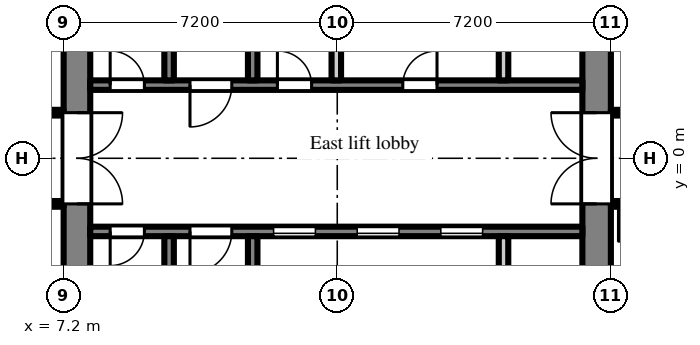
"""IFC4 building model, lengths in metres.
Left out: names, types, materials, properties, quantities, classifications, styles, units other than length and angle.
Written with IfcOpenShell. Run it as: python <this file> out.ifc"""

import sys

from ifc_helpers import new_model, si_unit, direction, frame, frame_2d, origin, place, context, subcontext, project, spatial, rectangle, extrude, element, fill, save


model = new_model("IFC4")
c1 = context("Model", 3, precision=1e-05, world=origin(), true_north=direction((0.0, 1.0)))
c2 = subcontext(c1, "Body", "Model", "MODEL_VIEW")
j1 = project(units=[si_unit("LENGTHUNIT", "METRE"), si_unit("PLANEANGLEUNIT", "RADIAN")], contexts=[c1])
p1 = place(None, origin())
s1 = spatial("IfcSite", under=j1, at=p1, CompositionType="ELEMENT")
p2 = place(p1, origin())
s2 = spatial("IfcBuilding", under=s1, at=p2, CompositionType="ELEMENT")
p3 = place(p2, frame((0.0, 0.0, 108.9)))
s3 = spatial("IfcBuildingStorey", under=s2, at=p3, CompositionType="ELEMENT", Elevation=108.9)
p4 = place(p3, frame((7.55, -7.2, 0.0), z_axis=(0.0, 0.0, 1.0), x_axis=(0.0, 1.0, 0.0)))
e1 = element("IfcWall", 1, at=p4, inside=s3, PredefinedType="SHEAR", context=c2, shape_type="SweptSolid", body=[
    extrude(rectangle(XDim=14.4, YDim=0.7, at=frame_2d((7.2, 0.0))), origin(), (0.0, 0.0, 1.0), 2.55),
])
p5 = place(p4, frame((6.0, 0.0, 0.0)))
e2 = element("IfcOpeningElement", 2, at=p5, cuts=e1, PredefinedType="OPENING", context=c2, shape_type="SweptSolid", body=[
    extrude(rectangle(XDim=2.4, YDim=2.2, at=frame_2d((1.2, 1.1))), frame((0.0, 0.36, 0.0), z_axis=(0.0, -1.0, 0.0), x_axis=(1.0, 0.0, 0.0)), (0.0, 0.0, 1.0), 0.72),
])
p6 = place(p3, frame((21.225, -7.2, 0.0), z_axis=(0.0, 0.0, 1.0), x_axis=(0.0, 1.0, 0.0)))
e3 = element("IfcWall", 3, at=p6, inside=s3, PredefinedType="SHEAR", context=c2, shape_type="SweptSolid", body=[
    extrude(rectangle(XDim=14.4, YDim=0.75, at=frame_2d((7.2, 0.0))), origin(), (0.0, 0.0, 1.0), 2.55),
])
p7 = place(p6, frame((6.0, 0.0, 0.0)))
e4 = element("IfcOpeningElement", 4, at=p7, cuts=e3, PredefinedType="OPENING", context=c2, shape_type="SweptSolid", body=[
    extrude(rectangle(XDim=2.4, YDim=2.2, at=frame_2d((1.2, 1.1))), frame((0.0, 0.385, 0.0), z_axis=(0.0, -1.0, 0.0), x_axis=(1.0, 0.0, 0.0)), (0.0, 0.0, 1.0), 0.77),
])
p8 = place(p3, frame((7.9, 1.925, 0.0), z_axis=(0.0, 0.0, 1.0), x_axis=(1.0, 0.0, 0.0)))
e5 = element("IfcWall", 5, at=p8, inside=s3, PredefinedType="SHEAR", context=c2, shape_type="SweptSolid", body=[
    extrude(rectangle(XDim=12.95, YDim=0.25, at=frame_2d((6.475, 0.0))), origin(), (0.0, 0.0, 1.0), 2.55),
])
p9 = place(p8, frame((0.525, 0.0, 0.0)))
e6 = element("IfcOpeningElement", 6, at=p9, cuts=e5, PredefinedType="OPENING", context=c2, shape_type="SweptSolid", body=[
    extrude(rectangle(XDim=0.9, YDim=2.1, at=frame_2d((0.45, 1.05))), frame((0.0, 0.135, 0.0), z_axis=(0.0, -1.0, 0.0), x_axis=(1.0, 0.0, 0.0)), (0.0, 0.0, 1.0), 0.27),
])
p10 = place(p8, frame((2.625, 0.0, 0.0)))
e7 = element("IfcOpeningElement", 7, at=p10, cuts=e5, PredefinedType="OPENING", context=c2, shape_type="SweptSolid", body=[
    extrude(rectangle(XDim=1.1, YDim=2.1, at=frame_2d((0.55, 1.05))), frame((0.0, 0.135, 0.0), z_axis=(0.0, -1.0, 0.0), x_axis=(1.0, 0.0, 0.0)), (0.0, 0.0, 1.0), 0.27),
])
p11 = place(p8, frame((4.925, 0.0, 0.0)))
e8 = element("IfcOpeningElement", 8, at=p11, cuts=e5, PredefinedType="OPENING", context=c2, shape_type="SweptSolid", body=[
    extrude(rectangle(XDim=0.9, YDim=2.1, at=frame_2d((0.45, 1.05))), frame((0.0, 0.135, 0.0), z_axis=(0.0, -1.0, 0.0), x_axis=(1.0, 0.0, 0.0)), (0.0, 0.0, 1.0), 0.27),
])
p12 = place(p8, frame((8.225, 0.0, 0.0)))
e9 = element("IfcOpeningElement", 9, at=p12, cuts=e5, PredefinedType="OPENING", context=c2, shape_type="SweptSolid", body=[
    extrude(rectangle(XDim=0.9, YDim=2.1, at=frame_2d((0.45, 1.05))), frame((0.0, 0.135, 0.0), z_axis=(0.0, -1.0, 0.0), x_axis=(1.0, 0.0, 0.0)), (0.0, 0.0, 1.0), 0.27),
])
p13 = place(p3, frame((9.975, 2.05, 0.0), z_axis=(0.0, 0.0, 1.0), x_axis=(0.0, 1.0, 0.0)))
e10 = element("IfcWall", 10, at=p13, inside=s3, PredefinedType="SHEAR", context=c2, shape_type="SweptSolid", body=[
    extrude(rectangle(XDim=4.65, YDim=0.25, at=frame_2d((2.325, 0.0))), origin(), (0.0, 0.0, 1.0), 2.55),
])
p14 = place(p13, frame((2.95, 0.0, 0.0)))
e11 = element("IfcOpeningElement", 11, at=p14, cuts=e10, PredefinedType="OPENING", context=c2, shape_type="SweptSolid", body=[
    extrude(rectangle(XDim=1.1, YDim=2.1, at=frame_2d((0.55, 1.05))), frame((0.0, 0.135, 0.0), z_axis=(0.0, -1.0, 0.0), x_axis=(1.0, 0.0, 0.0)), (0.0, 0.0, 1.0), 0.27),
])
p15 = place(p3, frame((12.175, 2.05, 0.0), z_axis=(0.0, 0.0, 1.0), x_axis=(0.0, 1.0, 0.0)))
e12 = element("IfcWall", 12, at=p15, inside=s3, PredefinedType="SHEAR", context=c2, shape_type="SweptSolid", body=[
    extrude(rectangle(XDim=4.65, YDim=0.25, at=frame_2d((2.325, 0.0))), origin(), (0.0, 0.0, 1.0), 2.55),
])
p16 = place(p15, frame((2.95, 0.0, 0.0)))
e13 = element("IfcOpeningElement", 13, at=p16, cuts=e12, PredefinedType="OPENING", context=c2, shape_type="SweptSolid", body=[
    extrude(rectangle(XDim=1.1, YDim=2.1, at=frame_2d((0.55, 1.05))), frame((0.0, 0.135, 0.0), z_axis=(0.0, -1.0, 0.0), x_axis=(1.0, 0.0, 0.0)), (0.0, 0.0, 1.0), 0.27),
])
for number, where, z_axis, x_axis in (
    (14, (14.375, 2.05, 0.0), (0.0, 0.0, 1.0), (0.0, 1.0, 0.0)),
    (15, (18.775, 2.05, 0.0), (0.0, 0.0, 1.0), (0.0, 1.0, 0.0)),
):
    element("IfcWall", number, at=place(p3, frame(where, z_axis=z_axis, x_axis=x_axis)), inside=s3, PredefinedType="PARTITIONING", context=c2, shape_type="SweptSolid", body=[
        extrude(rectangle(XDim=2.1, YDim=0.25, at=frame_2d((1.05, 0.0))), origin(), (0.0, 0.0, 1.0), 2.55),
    ])
p17 = place(p3, frame((7.9, -1.925, 0.0), z_axis=(0.0, 0.0, 1.0), x_axis=(1.0, 0.0, 0.0)))
e16 = element("IfcWall", 16, at=p17, inside=s3, PredefinedType="SHEAR", context=c2, shape_type="SweptSolid", body=[
    extrude(rectangle(XDim=12.95, YDim=0.25, at=frame_2d((6.475, 0.0))), origin(), (0.0, 0.0, 1.0), 2.55),
])
p18 = place(p17, frame((4.825, 0.0, 0.0)))
e17 = element("IfcOpeningElement", 17, at=p18, cuts=e16, PredefinedType="OPENING", context=c2, shape_type="SweptSolid", body=[
    extrude(rectangle(XDim=1.1, YDim=2.1, at=frame_2d((0.55, 1.05))), frame((0.0, 0.135, 0.0), z_axis=(0.0, -1.0, 0.0), x_axis=(1.0, 0.0, 0.0)), (0.0, 0.0, 1.0), 0.27),
])
p19 = place(p17, frame((7.025, 0.0, 0.0)))
e18 = element("IfcOpeningElement", 18, at=p19, cuts=e16, PredefinedType="OPENING", context=c2, shape_type="SweptSolid", body=[
    extrude(rectangle(XDim=1.1, YDim=2.1, at=frame_2d((0.55, 1.05))), frame((0.0, 0.135, 0.0), z_axis=(0.0, -1.0, 0.0), x_axis=(1.0, 0.0, 0.0)), (0.0, 0.0, 1.0), 0.27),
])
p20 = place(p17, frame((9.225, 0.0, 0.0)))
e19 = element("IfcOpeningElement", 19, at=p20, cuts=e16, PredefinedType="OPENING", context=c2, shape_type="SweptSolid", body=[
    extrude(rectangle(XDim=1.1, YDim=2.1, at=frame_2d((0.55, 1.05))), frame((0.0, 0.135, 0.0), z_axis=(0.0, -1.0, 0.0), x_axis=(1.0, 0.0, 0.0)), (0.0, 0.0, 1.0), 0.27),
])
p21 = place(p17, frame((0.525, 0.0, 0.0)))
e20 = element("IfcOpeningElement", 20, at=p21, cuts=e16, PredefinedType="OPENING", context=c2, shape_type="SweptSolid", body=[
    extrude(rectangle(XDim=0.9, YDim=2.1, at=frame_2d((0.45, 1.05))), frame((0.0, 0.135, 0.0), z_axis=(0.0, -1.0, 0.0), x_axis=(1.0, 0.0, 0.0)), (0.0, 0.0, 1.0), 0.27),
])
p22 = place(p17, frame((2.625, 0.0, 0.0)))
e21 = element("IfcOpeningElement", 21, at=p22, cuts=e16, PredefinedType="OPENING", context=c2, shape_type="SweptSolid", body=[
    extrude(rectangle(XDim=1.1, YDim=2.1, at=frame_2d((0.55, 1.05))), frame((0.0, 0.135, 0.0), z_axis=(0.0, -1.0, 0.0), x_axis=(1.0, 0.0, 0.0)), (0.0, 0.0, 1.0), 0.27),
])
p23 = place(p3, frame((9.975, -2.05, 0.0), z_axis=(0.0, 0.0, 1.0), x_axis=(0.0, -1.0, 0.0)))
e22 = element("IfcWall", 22, at=p23, inside=s3, PredefinedType="SHEAR", context=c2, shape_type="SweptSolid", body=[
    extrude(rectangle(XDim=4.65, YDim=0.25, at=frame_2d((2.325, 0.0))), origin(), (0.0, 0.0, 1.0), 2.55),
])
p24 = place(p23, frame((2.95, 0.0, 0.0)))
e23 = element("IfcOpeningElement", 23, at=p24, cuts=e22, PredefinedType="OPENING", context=c2, shape_type="SweptSolid", body=[
    extrude(rectangle(XDim=1.1, YDim=2.1, at=frame_2d((0.55, 1.05))), frame((0.0, 0.135, 0.0), z_axis=(0.0, -1.0, 0.0), x_axis=(1.0, 0.0, 0.0)), (0.0, 0.0, 1.0), 0.27),
])
p25 = place(p3, frame((12.175, -2.05, 0.0), z_axis=(0.0, 0.0, 1.0), x_axis=(0.0, -1.0, 0.0)))
e24 = element("IfcWall", 24, at=p25, inside=s3, PredefinedType="SHEAR", context=c2, shape_type="SweptSolid", body=[
    extrude(rectangle(XDim=4.65, YDim=0.25, at=frame_2d((2.325, 0.0))), origin(), (0.0, 0.0, 1.0), 2.55),
])
p26 = place(p25, frame((2.95, 0.0, 0.0)))
e25 = element("IfcOpeningElement", 25, at=p26, cuts=e24, PredefinedType="OPENING", context=c2, shape_type="SweptSolid", body=[
    extrude(rectangle(XDim=1.1, YDim=2.1, at=frame_2d((0.55, 1.05))), frame((0.0, 0.135, 0.0), z_axis=(0.0, -1.0, 0.0), x_axis=(1.0, 0.0, 0.0)), (0.0, 0.0, 1.0), 0.27),
])
p27 = place(p3, frame((18.775, -2.05, 0.0), z_axis=(0.0, 0.0, 1.0), x_axis=(0.0, -1.0, 0.0)))
e26 = element("IfcWall", 26, at=p27, inside=s3, PredefinedType="PARTITIONING", context=c2, shape_type="SweptSolid", body=[
    extrude(rectangle(XDim=2.1, YDim=0.25, at=frame_2d((1.05, 0.0))), origin(), (0.0, 0.0, 1.0), 2.55),
])
p28 = place(p3, frame((1.275, -1.2, 0.0), z_axis=(0.0, 0.0, 1.0), x_axis=(1.0, 0.0, 0.0)))
e27 = element("IfcWall", 27, at=p28, inside=s3, PredefinedType="PARTITIONING", context=c2, shape_type="SweptSolid", body=[
    extrude(rectangle(XDim=5.925, YDim=0.15, at=frame_2d((2.962, 0.0))), origin(), (0.0, 0.0, 1.0), 2.55),
])
p29 = place(p28, frame((3.075, 0.0, 0.0)))
e28 = element("IfcOpeningElement", 28, at=p29, cuts=e27, PredefinedType="OPENING", context=c2, shape_type="SweptSolid", body=[
    extrude(rectangle(XDim=0.9, YDim=2.1, at=frame_2d((0.45, 1.05))), frame((0.0, 0.085, 0.0), z_axis=(0.0, -1.0, 0.0), x_axis=(1.0, 0.0, 0.0)), (0.0, 0.0, 1.0), 0.17),
])
p30 = place(p3, frame((1.275, 1.2, 0.0), z_axis=(0.0, 0.0, 1.0), x_axis=(1.0, 0.0, 0.0)))
e29 = element("IfcWall", 29, at=p30, inside=s3, PredefinedType="PARTITIONING", context=c2, shape_type="SweptSolid", body=[
    extrude(rectangle(XDim=5.925, YDim=0.15, at=frame_2d((2.962, 0.0))), origin(), (0.0, 0.0, 1.0), 2.55),
])
p31 = place(p30, frame((2.475, 0.0, 0.0)))
e30 = element("IfcOpeningElement", 30, at=p31, cuts=e29, PredefinedType="OPENING", context=c2, shape_type="SweptSolid", body=[
    extrude(rectangle(XDim=0.9, YDim=2.1, at=frame_2d((0.45, 1.05))), frame((0.0, 0.085, 0.0), z_axis=(0.0, -1.0, 0.0), x_axis=(1.0, 0.0, 0.0)), (0.0, 0.0, 1.0), 0.17),
])
p32 = place(p3, frame((21.6, -1.2, 0.0), z_axis=(0.0, 0.0, 1.0), x_axis=(1.0, 0.0, 0.0)))
e31 = element("IfcWall", 31, at=p32, inside=s3, PredefinedType="PARTITIONING", context=c2, shape_type="SweptSolid", body=[
    extrude(rectangle(XDim=14.9, YDim=0.15, at=frame_2d((7.45, 0.0))), origin(), (0.0, 0.0, 1.0), 2.55),
])
p33 = place(p32, frame((0.2, 0.0, 0.0)))
e32 = element("IfcOpeningElement", 32, at=p33, cuts=e31, PredefinedType="OPENING", context=c2, shape_type="SweptSolid", body=[
    extrude(rectangle(XDim=1.0, YDim=2.1, at=frame_2d((0.5, 1.05))), frame((0.0, 0.085, 0.0), z_axis=(0.0, -1.0, 0.0), x_axis=(1.0, 0.0, 0.0)), (0.0, 0.0, 1.0), 0.17),
])
p34 = place(p32, frame((5.71, 0.0, 0.0)))
e33 = element("IfcOpeningElement", 33, at=p34, cuts=e31, PredefinedType="OPENING", context=c2, shape_type="SweptSolid", body=[
    extrude(rectangle(XDim=1.0, YDim=2.1, at=frame_2d((0.5, 1.05))), frame((0.0, 0.085, 0.0), z_axis=(0.0, -1.0, 0.0), x_axis=(1.0, 0.0, 0.0)), (0.0, 0.0, 1.0), 0.17),
])
p35 = place(p32, frame((11.95, 0.0, 0.0)))
e34 = element("IfcOpeningElement", 34, at=p35, cuts=e31, PredefinedType="OPENING", context=c2, shape_type="SweptSolid", body=[
    extrude(rectangle(XDim=1.8, YDim=2.1, at=frame_2d((0.9, 1.05))), frame((0.0, 0.085, 0.0), z_axis=(0.0, -1.0, 0.0), x_axis=(1.0, 0.0, 0.0)), (0.0, 0.0, 1.0), 0.17),
])
p36 = place(p3, frame((21.6, 1.2, 0.0), z_axis=(0.0, 0.0, 1.0), x_axis=(1.0, 0.0, 0.0)))
e35 = element("IfcWall", 35, at=p36, inside=s3, PredefinedType="PARTITIONING", context=c2, shape_type="SweptSolid", body=[
    extrude(rectangle(XDim=14.9, YDim=0.15, at=frame_2d((7.45, 0.0))), origin(), (0.0, 0.0, 1.0), 2.55),
])
p37 = place(p36, frame((0.45, 0.0, 0.0)))
e36 = element("IfcOpeningElement", 36, at=p37, cuts=e35, PredefinedType="OPENING", context=c2, shape_type="SweptSolid", body=[
    extrude(rectangle(XDim=0.9, YDim=2.1, at=frame_2d((0.45, 1.05))), frame((0.0, 0.085, 0.0), z_axis=(0.0, -1.0, 0.0), x_axis=(1.0, 0.0, 0.0)), (0.0, 0.0, 1.0), 0.17),
])
p38 = place(p36, frame((2.25, 0.0, 0.0)))
e37 = element("IfcOpeningElement", 37, at=p38, cuts=e35, PredefinedType="OPENING", context=c2, shape_type="SweptSolid", body=[
    extrude(rectangle(XDim=0.9, YDim=2.1, at=frame_2d((0.45, 1.05))), frame((0.0, 0.085, 0.0), z_axis=(0.0, -1.0, 0.0), x_axis=(1.0, 0.0, 0.0)), (0.0, 0.0, 1.0), 0.17),
])
p39 = place(p36, frame((6.3, 0.0, 0.0)))
e38 = element("IfcOpeningElement", 38, at=p39, cuts=e35, PredefinedType="OPENING", context=c2, shape_type="SweptSolid", body=[
    extrude(rectangle(XDim=1.8, YDim=2.1, at=frame_2d((0.9, 1.05))), frame((0.0, 0.085, 0.0), z_axis=(0.0, -1.0, 0.0), x_axis=(1.0, 0.0, 0.0)), (0.0, 0.0, 1.0), 0.17),
])
p40 = place(p36, frame((11.95, 0.0, 0.0)))
e39 = element("IfcOpeningElement", 39, at=p40, cuts=e35, PredefinedType="OPENING", context=c2, shape_type="SweptSolid", body=[
    extrude(rectangle(XDim=1.8, YDim=2.1, at=frame_2d((0.9, 1.05))), frame((0.0, 0.085, 0.0), z_axis=(0.0, -1.0, 0.0), x_axis=(1.0, 0.0, 0.0)), (0.0, 0.0, 1.0), 0.17),
])
p41 = place(p18, origin())
e40 = element("IfcDoor", 40, at=p41, inside=s3, OperationType="SLIDING_TO_LEFT", PredefinedType="DOOR", context=c2, shape_type="SweptSolid", body=[
    extrude(rectangle(XDim=1.1, YDim=2.1, at=frame_2d((0.55, 1.05))), frame((0.0, 0.025, 0.0), z_axis=(0.0, -1.0, 0.0), x_axis=(1.0, 0.0, 0.0)), (0.0, 0.0, 1.0), 0.05),
])
fill(e17, e40)
p42 = place(p19, origin())
e41 = element("IfcDoor", 41, at=p42, inside=s3, OperationType="SLIDING_TO_LEFT", PredefinedType="DOOR", context=c2, shape_type="SweptSolid", body=[
    extrude(rectangle(XDim=1.1, YDim=2.1, at=frame_2d((0.55, 1.05))), frame((0.0, 0.025, 0.0), z_axis=(0.0, -1.0, 0.0), x_axis=(1.0, 0.0, 0.0)), (0.0, 0.0, 1.0), 0.05),
])
fill(e18, e41)
p43 = place(p20, origin())
e42 = element("IfcDoor", 42, at=p43, inside=s3, OperationType="SLIDING_TO_LEFT", PredefinedType="DOOR", context=c2, shape_type="SweptSolid", body=[
    extrude(rectangle(XDim=1.1, YDim=2.1, at=frame_2d((0.55, 1.05))), frame((0.0, 0.025, 0.0), z_axis=(0.0, -1.0, 0.0), x_axis=(1.0, 0.0, 0.0)), (0.0, 0.0, 1.0), 0.05),
])
fill(e19, e42)
p44 = place(p9, origin())
e43 = element("IfcDoor", 43, at=p44, inside=s3, OperationType="SINGLE_SWING_LEFT", PredefinedType="DOOR", context=c2, shape_type="SweptSolid", body=[
    extrude(rectangle(XDim=0.9, YDim=2.1, at=frame_2d((0.45, 1.05))), frame((0.0, 0.025, 0.0), z_axis=(0.0, -1.0, 0.0), x_axis=(1.0, 0.0, 0.0)), (0.0, 0.0, 1.0), 0.05),
])
fill(e6, e43)
p45 = place(p21, frame((0.9, 0.0, 0.0), z_axis=(0.0, 0.0, 1.0), x_axis=(-1.0, 0.0, 0.0)))
e44 = element("IfcDoor", 44, at=p45, inside=s3, OperationType="SINGLE_SWING_RIGHT", PredefinedType="DOOR", context=c2, shape_type="SweptSolid", body=[
    extrude(rectangle(XDim=0.9, YDim=2.1, at=frame_2d((0.45, 1.05))), frame((0.0, 0.025, 0.0), z_axis=(0.0, -1.0, 0.0), x_axis=(1.0, 0.0, 0.0)), (0.0, 0.0, 1.0), 0.05),
])
fill(e20, e44)
p46 = place(p10, frame((1.1, 0.0, 0.0), z_axis=(0.0, 0.0, 1.0), x_axis=(-1.0, 0.0, 0.0)))
e45 = element("IfcDoor", 45, at=p46, inside=s3, OperationType="SINGLE_SWING_RIGHT", PredefinedType="DOOR", context=c2, shape_type="SweptSolid", body=[
    extrude(rectangle(XDim=1.1, YDim=2.1, at=frame_2d((0.55, 1.05))), frame((0.0, 0.025, 0.0), z_axis=(0.0, -1.0, 0.0), x_axis=(1.0, 0.0, 0.0)), (0.0, 0.0, 1.0), 0.05),
])
fill(e7, e45)
p47 = place(p22, frame((1.1, 0.0, 0.0), z_axis=(0.0, 0.0, 1.0), x_axis=(-1.0, 0.0, 0.0)))
e46 = element("IfcDoor", 46, at=p47, inside=s3, OperationType="SINGLE_SWING_RIGHT", PredefinedType="DOOR", context=c2, shape_type="SweptSolid", body=[
    extrude(rectangle(XDim=1.1, YDim=2.1, at=frame_2d((0.55, 1.05))), frame((0.0, 0.025, 0.0), z_axis=(0.0, -1.0, 0.0), x_axis=(1.0, 0.0, 0.0)), (0.0, 0.0, 1.0), 0.05),
])
fill(e21, e46)
p48 = place(p5, frame((2.4, 0.0, 0.0), z_axis=(0.0, 0.0, 1.0), x_axis=(-1.0, 0.0, 0.0)))
e47 = element("IfcDoor", 47, at=p48, inside=s3, OperationType="DOUBLE_DOOR_DOUBLE_SWING", PredefinedType="DOOR", context=c2, shape_type="SweptSolid", body=[
    extrude(rectangle(XDim=2.4, YDim=2.2, at=frame_2d((1.2, 1.1))), frame((0.0, 0.025, 0.0), z_axis=(0.0, -1.0, 0.0), x_axis=(1.0, 0.0, 0.0)), (0.0, 0.0, 1.0), 0.05),
])
fill(e2, e47)
p49 = place(p7, origin())
e48 = element("IfcDoor", 48, at=p49, inside=s3, OperationType="DOUBLE_DOOR_DOUBLE_SWING", PredefinedType="DOOR", context=c2, shape_type="SweptSolid", body=[
    extrude(rectangle(XDim=2.4, YDim=2.2, at=frame_2d((1.2, 1.1))), frame((0.0, 0.025, 0.0), z_axis=(0.0, -1.0, 0.0), x_axis=(1.0, 0.0, 0.0)), (0.0, 0.0, 1.0), 0.05),
])
fill(e4, e48)
p50 = place(p11, origin())
e49 = element("IfcDoor", 49, at=p50, inside=s3, OperationType="SINGLE_SWING_LEFT", PredefinedType="DOOR", context=c2, shape_type="SweptSolid", body=[
    extrude(rectangle(XDim=0.9, YDim=2.1, at=frame_2d((0.45, 1.05))), frame((0.0, 0.025, 0.0), z_axis=(0.0, -1.0, 0.0), x_axis=(1.0, 0.0, 0.0)), (0.0, 0.0, 1.0), 0.05),
])
fill(e8, e49)
p51 = place(p12, origin())
e50 = element("IfcDoor", 50, at=p51, inside=s3, OperationType="SINGLE_SWING_RIGHT", PredefinedType="DOOR", context=c2, shape_type="SweptSolid", body=[
    extrude(rectangle(XDim=0.9, YDim=2.1, at=frame_2d((0.45, 1.05))), frame((0.0, 0.025, 0.0), z_axis=(0.0, -1.0, 0.0), x_axis=(1.0, 0.0, 0.0)), (0.0, 0.0, 1.0), 0.05),
])
fill(e9, e50)
p52 = place(p33, frame((1.0, 0.0, 0.0), z_axis=(0.0, 0.0, 1.0), x_axis=(-1.0, 0.0, 0.0)))
e51 = element("IfcDoor", 51, at=p52, inside=s3, OperationType="SINGLE_SWING_RIGHT", PredefinedType="DOOR", context=c2, shape_type="SweptSolid", body=[
    extrude(rectangle(XDim=1.0, YDim=2.1, at=frame_2d((0.5, 1.05))), frame((0.0, 0.025, 0.0), z_axis=(0.0, -1.0, 0.0), x_axis=(1.0, 0.0, 0.0)), (0.0, 0.0, 1.0), 0.05),
])
fill(e32, e51)
save(model, sys.argv[1])
